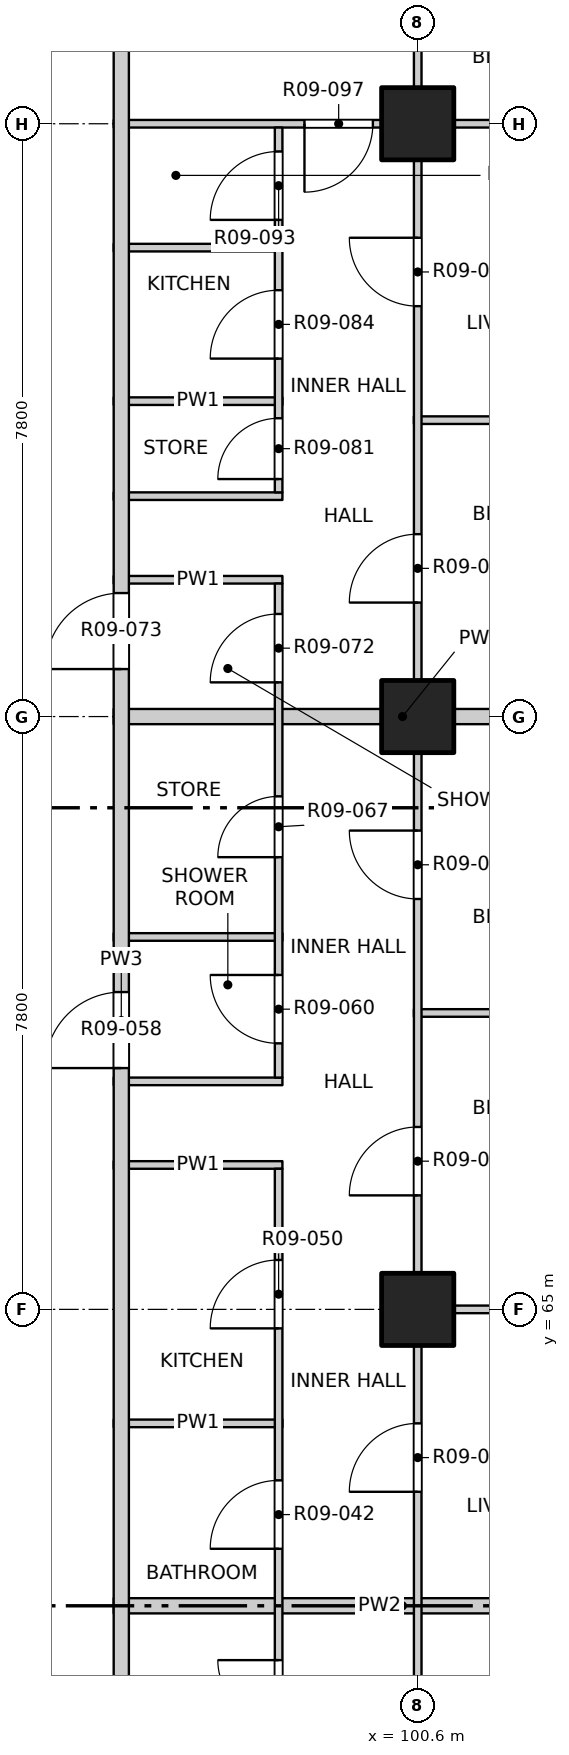
"""IFC4 building model, lengths in metres.
Left out: names, types, materials, properties, quantities, classifications, styles, units other than length and angle.
Written with IfcOpenShell. Run it as: python <this file> out.ifc"""

import sys

from ifc_helpers import new_model, si_unit, direction, frame, frame_2d, origin, origin_2d, place, context, subcontext, project, spatial, rectangle, extrude, element, fill, save


model = new_model("IFC4")
c1 = context("Model", 3, precision=1e-05, world=origin(), true_north=direction((0.0, 1.0)))
c2 = subcontext(c1, "Body", "Model", "MODEL_VIEW")
j1 = project(units=[si_unit("LENGTHUNIT", "METRE"), si_unit("PLANEANGLEUNIT", "RADIAN")], contexts=[c1])
p1 = place(None, origin())
s1 = spatial("IfcSite", under=j1, at=p1, CompositionType="ELEMENT")
p2 = place(p1, origin())
s2 = spatial("IfcBuilding", under=s1, at=p2, CompositionType="ELEMENT")
p3 = place(p2, frame((0.0, 0.0, 113.5)))
s3 = spatial("IfcBuildingStorey", under=s2, at=p3, CompositionType="ELEMENT", Elevation=113.5)
for number, where, z_axis, x_axis in (
    (1, (100.6, 65.0, -0.25), (0.0, 0.0, 1.0), (1.0, 0.0, 0.0)),
    (2, (100.6, 72.8, -0.25), (0.0, 0.0, 1.0), (1.0, 0.0, 0.0)),
    (3, (100.6, 80.6, -0.25), (0.0, 0.0, 1.0), (1.0, 0.0, 0.0)),
):
    element("IfcColumn", number, at=place(p3, frame(where, z_axis=z_axis, x_axis=x_axis)), inside=s3, PredefinedType="COLUMN", context=c2, shape_type="SweptSolid", body=[
        extrude(rectangle(XDim=0.95, YDim=0.95, at=origin_2d()), origin(), (0.0, 0.0, 1.0), 3.35),
    ])
p4 = place(p3, frame((96.6, 61.1, 0.0), z_axis=(0.0, 0.0, 1.0), x_axis=(1.0, 0.0, 0.0)))
e4 = element("IfcWall", 4, at=p4, inside=s3, PredefinedType="PARTITIONING", context=c2, shape_type="SweptSolid", body=[
    extrude(rectangle(XDim=7.6, YDim=0.2, at=frame_2d((3.8, 0.0))), origin(), (0.0, 0.0, 1.0), 3.1),
])
p5 = place(p3, frame((96.6, 63.5, 0.0), z_axis=(0.0, 0.0, 1.0), x_axis=(1.0, 0.0, 0.0)))
e5 = element("IfcWall", 5, at=p5, inside=s3, PredefinedType="PARTITIONING", context=c2, shape_type="SweptSolid", body=[
    extrude(rectangle(XDim=2.22, YDim=0.1, at=frame_2d((1.11, 0.0))), origin(), (0.0, 0.0, 1.0), 3.1),
])
p6 = place(p3, frame((100.55, 65.0, 0.0), z_axis=(0.0, 0.0, 1.0), x_axis=(1.0, 0.0, 0.0)))
e6 = element("IfcWall", 6, at=p6, inside=s3, PredefinedType="PARTITIONING", context=c2, shape_type="SweptSolid", body=[
    extrude(rectangle(XDim=3.65, YDim=0.1, at=frame_2d((1.825, 0.0))), origin(), (0.0, 0.0, 1.0), 3.1),
])
for number, where, z_axis, x_axis in (
    (7, (96.6, 66.9, 0.0), (0.0, 0.0, 1.0), (1.0, 0.0, 0.0)),
    (8, (96.6, 68.0, 0.0), (0.0, 0.0, 1.0), (1.0, 0.0, 0.0)),
):
    element("IfcWall", number, at=place(p3, frame(where, z_axis=z_axis, x_axis=x_axis)), inside=s3, PredefinedType="PARTITIONING", context=c2, shape_type="SweptSolid", body=[
        extrude(rectangle(XDim=2.22, YDim=0.1, at=frame_2d((1.11, 0.0))), origin(), (0.0, 0.0, 1.0), 3.1),
    ])
p7 = place(p3, frame((100.55, 68.9, 0.0), z_axis=(0.0, 0.0, 1.0), x_axis=(1.0, 0.0, 0.0)))
e9 = element("IfcWall", 9, at=p7, inside=s3, PredefinedType="PARTITIONING", context=c2, shape_type="SweptSolid", body=[
    extrude(rectangle(XDim=3.65, YDim=0.1, at=frame_2d((1.825, 0.0))), origin(), (0.0, 0.0, 1.0), 3.1),
])
p8 = place(p3, frame((96.6, 69.9, 0.0), z_axis=(0.0, 0.0, 1.0), x_axis=(1.0, 0.0, 0.0)))
e10 = element("IfcWall", 10, at=p8, inside=s3, PredefinedType="PARTITIONING", context=c2, shape_type="SweptSolid", body=[
    extrude(rectangle(XDim=2.22, YDim=0.1, at=frame_2d((1.11, 0.0))), origin(), (0.0, 0.0, 1.0), 3.1),
])
p9 = place(p3, frame((96.6, 72.8, 0.0), z_axis=(0.0, 0.0, 1.0), x_axis=(1.0, 0.0, 0.0)))
e11 = element("IfcWall", 11, at=p9, inside=s3, PredefinedType="PARTITIONING", context=c2, shape_type="SweptSolid", body=[
    extrude(rectangle(XDim=7.6, YDim=0.2, at=frame_2d((3.8, 0.0))), origin(), (0.0, 0.0, 1.0), 3.1),
])
for number, where, z_axis, x_axis in (
    (12, (96.6, 74.6, 0.0), (0.0, 0.0, 1.0), (1.0, 0.0, 0.0)),
    (13, (96.6, 75.7, 0.0), (0.0, 0.0, 1.0), (1.0, 0.0, 0.0)),
):
    element("IfcWall", number, at=place(p3, frame(where, z_axis=z_axis, x_axis=x_axis)), inside=s3, PredefinedType="PARTITIONING", context=c2, shape_type="SweptSolid", body=[
        extrude(rectangle(XDim=2.22, YDim=0.1, at=frame_2d((1.11, 0.0))), origin(), (0.0, 0.0, 1.0), 3.1),
    ])
p10 = place(p3, frame((100.55, 76.7, 0.0), z_axis=(0.0, 0.0, 1.0), x_axis=(1.0, 0.0, 0.0)))
e14 = element("IfcWall", 14, at=p10, inside=s3, PredefinedType="PARTITIONING", context=c2, shape_type="SweptSolid", body=[
    extrude(rectangle(XDim=3.65, YDim=0.1, at=frame_2d((1.825, 0.0))), origin(), (0.0, 0.0, 1.0), 3.1),
])
for number, where, z_axis, x_axis in (
    (15, (96.6, 76.95, 0.0), (0.0, 0.0, 1.0), (1.0, 0.0, 0.0)),
    (16, (96.6, 78.97, 0.0), (0.0, 0.0, 1.0), (1.0, 0.0, 0.0)),
):
    element("IfcWall", number, at=place(p3, frame(where, z_axis=z_axis, x_axis=x_axis)), inside=s3, PredefinedType="PARTITIONING", context=c2, shape_type="SweptSolid", body=[
        extrude(rectangle(XDim=2.22, YDim=0.1, at=frame_2d((1.11, 0.0))), origin(), (0.0, 0.0, 1.0), 3.1),
    ])
p11 = place(p3, frame((96.6, 80.6, 0.0), z_axis=(0.0, 0.0, 1.0), x_axis=(1.0, 0.0, 0.0)))
e17 = element("IfcWall", 17, at=p11, inside=s3, PredefinedType="PARTITIONING", context=c2, shape_type="SweptSolid", body=[
    extrude(rectangle(XDim=7.6, YDim=0.1, at=frame_2d((3.8, 0.0))), origin(), (0.0, 0.0, 1.0), 3.1),
])
p12 = place(p11, frame((2.51, 0.0, 0.0)))
e18 = element("IfcOpeningElement", 18, at=p12, cuts=e17, PredefinedType="OPENING", context=c2, shape_type="SweptSolid", body=[
    extrude(rectangle(XDim=0.9, YDim=2.1, at=frame_2d((0.45, 1.05))), frame((0.0, 0.06, 0.0), z_axis=(0.0, -1.0, 0.0), x_axis=(1.0, 0.0, 0.0)), (0.0, 0.0, 1.0), 0.12),
])
p13 = place(p3, frame((96.7, 53.4, 0.0), z_axis=(0.0, 0.0, 1.0), x_axis=(0.0, 1.0, 0.0)))
e19 = element("IfcWall", 19, at=p13, inside=s3, PredefinedType="PARTITIONING", context=c2, shape_type="SweptSolid", body=[
    extrude(rectangle(XDim=30.8, YDim=0.2, at=frame_2d((15.4, 0.0))), origin(), (0.0, 0.0, 1.0), 3.1),
])
p14 = place(p13, frame((2.875, 0.0, 0.0)))
e20 = element("IfcOpeningElement", 20, at=p14, cuts=e19, PredefinedType="OPENING", context=c2, shape_type="SweptSolid", body=[
    extrude(rectangle(XDim=1.0, YDim=2.1, at=frame_2d((0.5, 1.05))), frame((0.0, 0.11, 0.0), z_axis=(0.0, -1.0, 0.0), x_axis=(1.0, 0.0, 0.0)), (0.0, 0.0, 1.0), 0.22),
])
p15 = place(p13, frame((14.775, 0.0, 0.0)))
e21 = element("IfcOpeningElement", 21, at=p15, cuts=e19, PredefinedType="OPENING", context=c2, shape_type="SweptSolid", body=[
    extrude(rectangle(XDim=1.0, YDim=2.1, at=frame_2d((0.5, 1.05))), frame((0.0, 0.11, 0.0), z_axis=(0.0, -1.0, 0.0), x_axis=(1.0, 0.0, 0.0)), (0.0, 0.0, 1.0), 0.22),
])
p16 = place(p13, frame((20.025, 0.0, 0.0)))
e22 = element("IfcOpeningElement", 22, at=p16, cuts=e19, PredefinedType="OPENING", context=c2, shape_type="SweptSolid", body=[
    extrude(rectangle(XDim=1.0, YDim=2.1, at=frame_2d((0.5, 1.05))), frame((0.0, 0.11, 0.0), z_axis=(0.0, -1.0, 0.0), x_axis=(1.0, 0.0, 0.0)), (0.0, 0.0, 1.0), 0.22),
])
p17 = place(p3, frame((98.77, 56.15, 0.0), z_axis=(0.0, 0.0, 1.0), x_axis=(0.0, 1.0, 0.0)))
e23 = element("IfcWall", 23, at=p17, inside=s3, PredefinedType="PARTITIONING", context=c2, shape_type="SweptSolid", body=[
    extrude(rectangle(XDim=10.7, YDim=0.1, at=frame_2d((5.35, 0.0))), origin(), (0.0, 0.0, 1.0), 3.1),
])
p18 = place(p17, frame((0.885, 0.0, 0.0)))
e24 = element("IfcOpeningElement", 24, at=p18, cuts=e23, PredefinedType="OPENING", context=c2, shape_type="SweptSolid", body=[
    extrude(rectangle(XDim=0.9, YDim=2.1, at=frame_2d((0.45, 1.05))), frame((0.0, 0.06, 0.0), z_axis=(0.0, -1.0, 0.0), x_axis=(1.0, 0.0, 0.0)), (0.0, 0.0, 1.0), 0.12),
])
p19 = place(p17, frame((3.435, 0.0, 0.0)))
e25 = element("IfcOpeningElement", 25, at=p19, cuts=e23, PredefinedType="OPENING", context=c2, shape_type="SweptSolid", body=[
    extrude(rectangle(XDim=0.8, YDim=2.1, at=frame_2d((0.4, 1.05))), frame((0.0, 0.06, 0.0), z_axis=(0.0, -1.0, 0.0), x_axis=(1.0, 0.0, 0.0)), (0.0, 0.0, 1.0), 0.12),
])
p20 = place(p17, frame((5.7, 0.0, 0.0)))
e26 = element("IfcOpeningElement", 26, at=p20, cuts=e23, PredefinedType="OPENING", context=c2, shape_type="SweptSolid", body=[
    extrude(rectangle(XDim=0.9, YDim=2.1, at=frame_2d((0.45, 1.05))), frame((0.0, 0.06, 0.0), z_axis=(0.0, -1.0, 0.0), x_axis=(1.0, 0.0, 0.0)), (0.0, 0.0, 1.0), 0.12),
])
p21 = place(p17, frame((8.6, 0.0, 0.0)))
e27 = element("IfcOpeningElement", 27, at=p21, cuts=e23, PredefinedType="OPENING", context=c2, shape_type="SweptSolid", body=[
    extrude(rectangle(XDim=0.9, YDim=2.1, at=frame_2d((0.45, 1.05))), frame((0.0, 0.06, 0.0), z_axis=(0.0, -1.0, 0.0), x_axis=(1.0, 0.0, 0.0)), (0.0, 0.0, 1.0), 0.12),
])
p22 = place(p3, frame((98.77, 68.05, 0.0), z_axis=(0.0, 0.0, 1.0), x_axis=(0.0, 1.0, 0.0)))
e28 = element("IfcWall", 28, at=p22, inside=s3, PredefinedType="PARTITIONING", context=c2, shape_type="SweptSolid", body=[
    extrude(rectangle(XDim=6.5, YDim=0.1, at=frame_2d((3.25, 0.0))), origin(), (0.0, 0.0, 1.0), 3.1),
])
p23 = place(p22, frame((0.45, 0.0, 0.0)))
e29 = element("IfcOpeningElement", 29, at=p23, cuts=e28, PredefinedType="OPENING", context=c2, shape_type="SweptSolid", body=[
    extrude(rectangle(XDim=0.9, YDim=2.1, at=frame_2d((0.45, 1.05))), frame((0.0, 0.06, 0.0), z_axis=(0.0, -1.0, 0.0), x_axis=(1.0, 0.0, 0.0)), (0.0, 0.0, 1.0), 0.12),
])
p24 = place(p22, frame((2.9, 0.0, 0.0)))
e30 = element("IfcOpeningElement", 30, at=p24, cuts=e28, PredefinedType="OPENING", context=c2, shape_type="SweptSolid", body=[
    extrude(rectangle(XDim=0.8, YDim=2.1, at=frame_2d((0.4, 1.05))), frame((0.0, 0.06, 0.0), z_axis=(0.0, -1.0, 0.0), x_axis=(1.0, 0.0, 0.0)), (0.0, 0.0, 1.0), 0.12),
])
p25 = place(p22, frame((5.2, 0.0, 0.0)))
e31 = element("IfcOpeningElement", 31, at=p25, cuts=e28, PredefinedType="OPENING", context=c2, shape_type="SweptSolid", body=[
    extrude(rectangle(XDim=0.9, YDim=2.1, at=frame_2d((0.45, 1.05))), frame((0.0, 0.06, 0.0), z_axis=(0.0, -1.0, 0.0), x_axis=(1.0, 0.0, 0.0)), (0.0, 0.0, 1.0), 0.12),
])
p26 = place(p3, frame((98.77, 75.75, 0.0), z_axis=(0.0, 0.0, 1.0), x_axis=(0.0, 1.0, 0.0)))
e32 = element("IfcWall", 32, at=p26, inside=s3, PredefinedType="PARTITIONING", context=c2, shape_type="SweptSolid", body=[
    extrude(rectangle(XDim=4.8, YDim=0.1, at=frame_2d((2.4, 0.0))), origin(), (0.0, 0.0, 1.0), 3.1),
])
p27 = place(p26, frame((0.175, 0.0, 0.0)))
e33 = element("IfcOpeningElement", 33, at=p27, cuts=e32, PredefinedType="OPENING", context=c2, shape_type="SweptSolid", body=[
    extrude(rectangle(XDim=0.8, YDim=2.1, at=frame_2d((0.4, 1.05))), frame((0.0, 0.06, 0.0), z_axis=(0.0, -1.0, 0.0), x_axis=(1.0, 0.0, 0.0)), (0.0, 0.0, 1.0), 0.12),
])
p28 = place(p26, frame((1.76, 0.0, 0.0)))
e34 = element("IfcOpeningElement", 34, at=p28, cuts=e32, PredefinedType="OPENING", context=c2, shape_type="SweptSolid", body=[
    extrude(rectangle(XDim=0.9, YDim=2.1, at=frame_2d((0.45, 1.05))), frame((0.0, 0.06, 0.0), z_axis=(0.0, -1.0, 0.0), x_axis=(1.0, 0.0, 0.0)), (0.0, 0.0, 1.0), 0.12),
])
p29 = place(p26, frame((3.585, 0.0, 0.0)))
e35 = element("IfcOpeningElement", 35, at=p29, cuts=e32, PredefinedType="OPENING", context=c2, shape_type="SweptSolid", body=[
    extrude(rectangle(XDim=0.9, YDim=2.1, at=frame_2d((0.45, 1.05))), frame((0.0, 0.06, 0.0), z_axis=(0.0, -1.0, 0.0), x_axis=(1.0, 0.0, 0.0)), (0.0, 0.0, 1.0), 0.12),
])
p30 = place(p3, frame((100.6, 45.8, 0.0), z_axis=(0.0, 0.0, 1.0), x_axis=(0.0, 1.0, 0.0)))
e36 = element("IfcWall", 36, at=p30, inside=s3, PredefinedType="PARTITIONING", context=c2, shape_type="SweptSolid", body=[
    extrude(rectangle(XDim=38.4, YDim=0.1, at=frame_2d((19.2, 0.0))), origin(), (0.0, 0.0, 1.0), 3.1),
])
p31 = place(p30, frame((1.05, 0.0, 0.0)))
e37 = element("IfcOpeningElement", 37, at=p31, cuts=e36, PredefinedType="OPENING", context=c2, shape_type="SweptSolid", body=[
    extrude(rectangle(XDim=1.2, YDim=2.1, at=frame_2d((0.6, 1.05))), frame((0.0, 0.06, 0.0), z_axis=(0.0, -1.0, 0.0), x_axis=(1.0, 0.0, 0.0)), (0.0, 0.0, 1.0), 0.12),
])
p32 = place(p30, frame((5.1, 0.0, 0.0)))
e38 = element("IfcOpeningElement", 38, at=p32, cuts=e36, PredefinedType="OPENING", context=c2, shape_type="SweptSolid", body=[
    extrude(rectangle(XDim=0.9, YDim=2.1, at=frame_2d((0.45, 1.05))), frame((0.0, 0.06, 0.0), z_axis=(0.0, -1.0, 0.0), x_axis=(1.0, 0.0, 0.0)), (0.0, 0.0, 1.0), 0.12),
])
p33 = place(p30, frame((9.625, 0.0, 0.0)))
e39 = element("IfcOpeningElement", 39, at=p33, cuts=e36, PredefinedType="OPENING", context=c2, shape_type="SweptSolid", body=[
    extrude(rectangle(XDim=1.2, YDim=2.1, at=frame_2d((0.6, 1.05))), frame((0.0, 0.06, 0.0), z_axis=(0.0, -1.0, 0.0), x_axis=(1.0, 0.0, 0.0)), (0.0, 0.0, 1.0), 0.12),
])
p34 = place(p30, frame((16.8, 0.0, 0.0)))
e40 = element("IfcOpeningElement", 40, at=p34, cuts=e36, PredefinedType="OPENING", context=c2, shape_type="SweptSolid", body=[
    extrude(rectangle(XDim=0.9, YDim=2.1, at=frame_2d((0.45, 1.05))), frame((0.0, 0.06, 0.0), z_axis=(0.0, -1.0, 0.0), x_axis=(1.0, 0.0, 0.0)), (0.0, 0.0, 1.0), 0.12),
])
p35 = place(p30, frame((20.7, 0.0, 0.0)))
e41 = element("IfcOpeningElement", 41, at=p35, cuts=e36, PredefinedType="OPENING", context=c2, shape_type="SweptSolid", body=[
    extrude(rectangle(XDim=0.9, YDim=2.1, at=frame_2d((0.45, 1.05))), frame((0.0, 0.06, 0.0), z_axis=(0.0, -1.0, 0.0), x_axis=(1.0, 0.0, 0.0)), (0.0, 0.0, 1.0), 0.12),
])
p36 = place(p30, frame((24.6, 0.0, 0.0)))
e42 = element("IfcOpeningElement", 42, at=p36, cuts=e36, PredefinedType="OPENING", context=c2, shape_type="SweptSolid", body=[
    extrude(rectangle(XDim=0.9, YDim=2.1, at=frame_2d((0.45, 1.05))), frame((0.0, 0.06, 0.0), z_axis=(0.0, -1.0, 0.0), x_axis=(1.0, 0.0, 0.0)), (0.0, 0.0, 1.0), 0.12),
])
p37 = place(p30, frame((28.5, 0.0, 0.0)))
e43 = element("IfcOpeningElement", 43, at=p37, cuts=e36, PredefinedType="OPENING", context=c2, shape_type="SweptSolid", body=[
    extrude(rectangle(XDim=0.9, YDim=2.1, at=frame_2d((0.45, 1.05))), frame((0.0, 0.06, 0.0), z_axis=(0.0, -1.0, 0.0), x_axis=(1.0, 0.0, 0.0)), (0.0, 0.0, 1.0), 0.12),
])
p38 = place(p30, frame((32.4, 0.0, 0.0)))
e44 = element("IfcOpeningElement", 44, at=p38, cuts=e36, PredefinedType="OPENING", context=c2, shape_type="SweptSolid", body=[
    extrude(rectangle(XDim=0.9, YDim=2.1, at=frame_2d((0.45, 1.05))), frame((0.0, 0.06, 0.0), z_axis=(0.0, -1.0, 0.0), x_axis=(1.0, 0.0, 0.0)), (0.0, 0.0, 1.0), 0.12),
])
p39 = place(p30, frame((36.15, 0.0, 0.0)))
e45 = element("IfcOpeningElement", 45, at=p39, cuts=e36, PredefinedType="OPENING", context=c2, shape_type="SweptSolid", body=[
    extrude(rectangle(XDim=1.2, YDim=2.1, at=frame_2d((0.6, 1.05))), frame((0.0, 0.06, 0.0), z_axis=(0.0, -1.0, 0.0), x_axis=(1.0, 0.0, 0.0)), (0.0, 0.0, 1.0), 0.12),
])
p40 = place(p19, origin())
e46 = element("IfcDoor", 46, at=p40, inside=s3, OperationType="SINGLE_SWING_RIGHT", PredefinedType="DOOR", context=c2, shape_type="SweptSolid", body=[
    extrude(rectangle(XDim=0.8, YDim=2.1, at=frame_2d((0.4, 1.05))), frame((0.0, 0.025, 0.0), z_axis=(0.0, -1.0, 0.0), x_axis=(1.0, 0.0, 0.0)), (0.0, 0.0, 1.0), 0.05),
])
fill(e25, e46)
p41 = place(p20, origin())
e47 = element("IfcDoor", 47, at=p41, inside=s3, OperationType="SINGLE_SWING_LEFT", PredefinedType="DOOR", context=c2, shape_type="SweptSolid", body=[
    extrude(rectangle(XDim=0.9, YDim=2.1, at=frame_2d((0.45, 1.05))), frame((0.0, 0.025, 0.0), z_axis=(0.0, -1.0, 0.0), x_axis=(1.0, 0.0, 0.0)), (0.0, 0.0, 1.0), 0.05),
])
fill(e26, e47)
p42 = place(p34, origin())
e48 = element("IfcDoor", 48, at=p42, inside=s3, OperationType="SINGLE_SWING_LEFT", PredefinedType="DOOR", context=c2, shape_type="SweptSolid", body=[
    extrude(rectangle(XDim=0.9, YDim=2.1, at=frame_2d((0.45, 1.05))), frame((0.0, 0.025, 0.0), z_axis=(0.0, -1.0, 0.0), x_axis=(1.0, 0.0, 0.0)), (0.0, 0.0, 1.0), 0.05),
])
fill(e40, e48)
p43 = place(p21, origin())
e49 = element("IfcDoor", 49, at=p43, inside=s3, OperationType="SINGLE_SWING_LEFT", PredefinedType="DOOR", context=c2, shape_type="SweptSolid", body=[
    extrude(rectangle(XDim=0.9, YDim=2.1, at=frame_2d((0.45, 1.05))), frame((0.0, 0.025, 0.0), z_axis=(0.0, -1.0, 0.0), x_axis=(1.0, 0.0, 0.0)), (0.0, 0.0, 1.0), 0.05),
])
fill(e27, e49)
p44 = place(p35, origin())
e50 = element("IfcDoor", 50, at=p44, inside=s3, OperationType="SINGLE_SWING_LEFT", PredefinedType="DOOR", context=c2, shape_type="SweptSolid", body=[
    extrude(rectangle(XDim=0.9, YDim=2.1, at=frame_2d((0.45, 1.05))), frame((0.0, 0.025, 0.0), z_axis=(0.0, -1.0, 0.0), x_axis=(1.0, 0.0, 0.0)), (0.0, 0.0, 1.0), 0.05),
])
fill(e41, e50)
p45 = place(p15, origin())
e51 = element("IfcDoor", 51, at=p45, inside=s3, OperationType="SINGLE_SWING_LEFT", PredefinedType="DOOR", context=c2, shape_type="SweptSolid", body=[
    extrude(rectangle(XDim=1.0, YDim=2.1, at=frame_2d((0.5, 1.05))), frame((0.0, 0.025, 0.0), z_axis=(0.0, -1.0, 0.0), x_axis=(1.0, 0.0, 0.0)), (0.0, 0.0, 1.0), 0.05),
])
fill(e21, e51)
p46 = place(p23, origin())
e52 = element("IfcDoor", 52, at=p46, inside=s3, OperationType="SINGLE_SWING_RIGHT", PredefinedType="DOOR", context=c2, shape_type="SweptSolid", body=[
    extrude(rectangle(XDim=0.9, YDim=2.1, at=frame_2d((0.45, 1.05))), frame((0.0, 0.025, 0.0), z_axis=(0.0, -1.0, 0.0), x_axis=(1.0, 0.0, 0.0)), (0.0, 0.0, 1.0), 0.05),
])
fill(e29, e52)
p47 = place(p36, origin())
e53 = element("IfcDoor", 53, at=p47, inside=s3, OperationType="SINGLE_SWING_RIGHT", PredefinedType="DOOR", context=c2, shape_type="SweptSolid", body=[
    extrude(rectangle(XDim=0.9, YDim=2.1, at=frame_2d((0.45, 1.05))), frame((0.0, 0.025, 0.0), z_axis=(0.0, -1.0, 0.0), x_axis=(1.0, 0.0, 0.0)), (0.0, 0.0, 1.0), 0.05),
])
fill(e42, e53)
p48 = place(p24, origin())
e54 = element("IfcDoor", 54, at=p48, inside=s3, OperationType="SINGLE_SWING_LEFT", PredefinedType="DOOR", context=c2, shape_type="SweptSolid", body=[
    extrude(rectangle(XDim=0.8, YDim=2.1, at=frame_2d((0.4, 1.05))), frame((0.0, 0.025, 0.0), z_axis=(0.0, -1.0, 0.0), x_axis=(1.0, 0.0, 0.0)), (0.0, 0.0, 1.0), 0.05),
])
fill(e30, e54)
p49 = place(p25, origin())
e55 = element("IfcDoor", 55, at=p49, inside=s3, OperationType="SINGLE_SWING_LEFT", PredefinedType="DOOR", context=c2, shape_type="SweptSolid", body=[
    extrude(rectangle(XDim=0.9, YDim=2.1, at=frame_2d((0.45, 1.05))), frame((0.0, 0.025, 0.0), z_axis=(0.0, -1.0, 0.0), x_axis=(1.0, 0.0, 0.0)), (0.0, 0.0, 1.0), 0.05),
])
fill(e31, e55)
p50 = place(p16, origin())
e56 = element("IfcDoor", 56, at=p50, inside=s3, OperationType="SINGLE_SWING_RIGHT", PredefinedType="DOOR", context=c2, shape_type="SweptSolid", body=[
    extrude(rectangle(XDim=1.0, YDim=2.1, at=frame_2d((0.5, 1.05))), frame((0.0, 0.025, 0.0), z_axis=(0.0, -1.0, 0.0), x_axis=(1.0, 0.0, 0.0)), (0.0, 0.0, 1.0), 0.05),
])
fill(e22, e56)
p51 = place(p37, origin())
e57 = element("IfcDoor", 57, at=p51, inside=s3, OperationType="SINGLE_SWING_LEFT", PredefinedType="DOOR", context=c2, shape_type="SweptSolid", body=[
    extrude(rectangle(XDim=0.9, YDim=2.1, at=frame_2d((0.45, 1.05))), frame((0.0, 0.025, 0.0), z_axis=(0.0, -1.0, 0.0), x_axis=(1.0, 0.0, 0.0)), (0.0, 0.0, 1.0), 0.05),
])
fill(e43, e57)
p52 = place(p27, origin())
e58 = element("IfcDoor", 58, at=p52, inside=s3, OperationType="SINGLE_SWING_LEFT", PredefinedType="DOOR", context=c2, shape_type="SweptSolid", body=[
    extrude(rectangle(XDim=0.8, YDim=2.1, at=frame_2d((0.4, 1.05))), frame((0.0, 0.025, 0.0), z_axis=(0.0, -1.0, 0.0), x_axis=(1.0, 0.0, 0.0)), (0.0, 0.0, 1.0), 0.05),
])
fill(e33, e58)
p53 = place(p28, origin())
e59 = element("IfcDoor", 59, at=p53, inside=s3, OperationType="SINGLE_SWING_LEFT", PredefinedType="DOOR", context=c2, shape_type="SweptSolid", body=[
    extrude(rectangle(XDim=0.9, YDim=2.1, at=frame_2d((0.45, 1.05))), frame((0.0, 0.025, 0.0), z_axis=(0.0, -1.0, 0.0), x_axis=(1.0, 0.0, 0.0)), (0.0, 0.0, 1.0), 0.05),
])
fill(e34, e59)
p54 = place(p38, origin())
e60 = element("IfcDoor", 60, at=p54, inside=s3, OperationType="SINGLE_SWING_RIGHT", PredefinedType="DOOR", context=c2, shape_type="SweptSolid", body=[
    extrude(rectangle(XDim=0.9, YDim=2.1, at=frame_2d((0.45, 1.05))), frame((0.0, 0.025, 0.0), z_axis=(0.0, -1.0, 0.0), x_axis=(1.0, 0.0, 0.0)), (0.0, 0.0, 1.0), 0.05),
])
fill(e44, e60)
p55 = place(p29, origin())
e61 = element("IfcDoor", 61, at=p55, inside=s3, OperationType="SINGLE_SWING_LEFT", PredefinedType="DOOR", context=c2, shape_type="SweptSolid", body=[
    extrude(rectangle(XDim=0.9, YDim=2.1, at=frame_2d((0.45, 1.05))), frame((0.0, 0.025, 0.0), z_axis=(0.0, -1.0, 0.0), x_axis=(1.0, 0.0, 0.0)), (0.0, 0.0, 1.0), 0.05),
])
fill(e35, e61)
p56 = place(p12, origin())
e62 = element("IfcDoor", 62, at=p56, inside=s3, OperationType="SINGLE_SWING_RIGHT", PredefinedType="DOOR", context=c2, shape_type="SweptSolid", body=[
    extrude(rectangle(XDim=0.9, YDim=2.1, at=frame_2d((0.45, 1.05))), frame((0.0, 0.025, 0.0), z_axis=(0.0, -1.0, 0.0), x_axis=(1.0, 0.0, 0.0)), (0.0, 0.0, 1.0), 0.05),
])
fill(e18, e62)
save(model, sys.argv[1])
